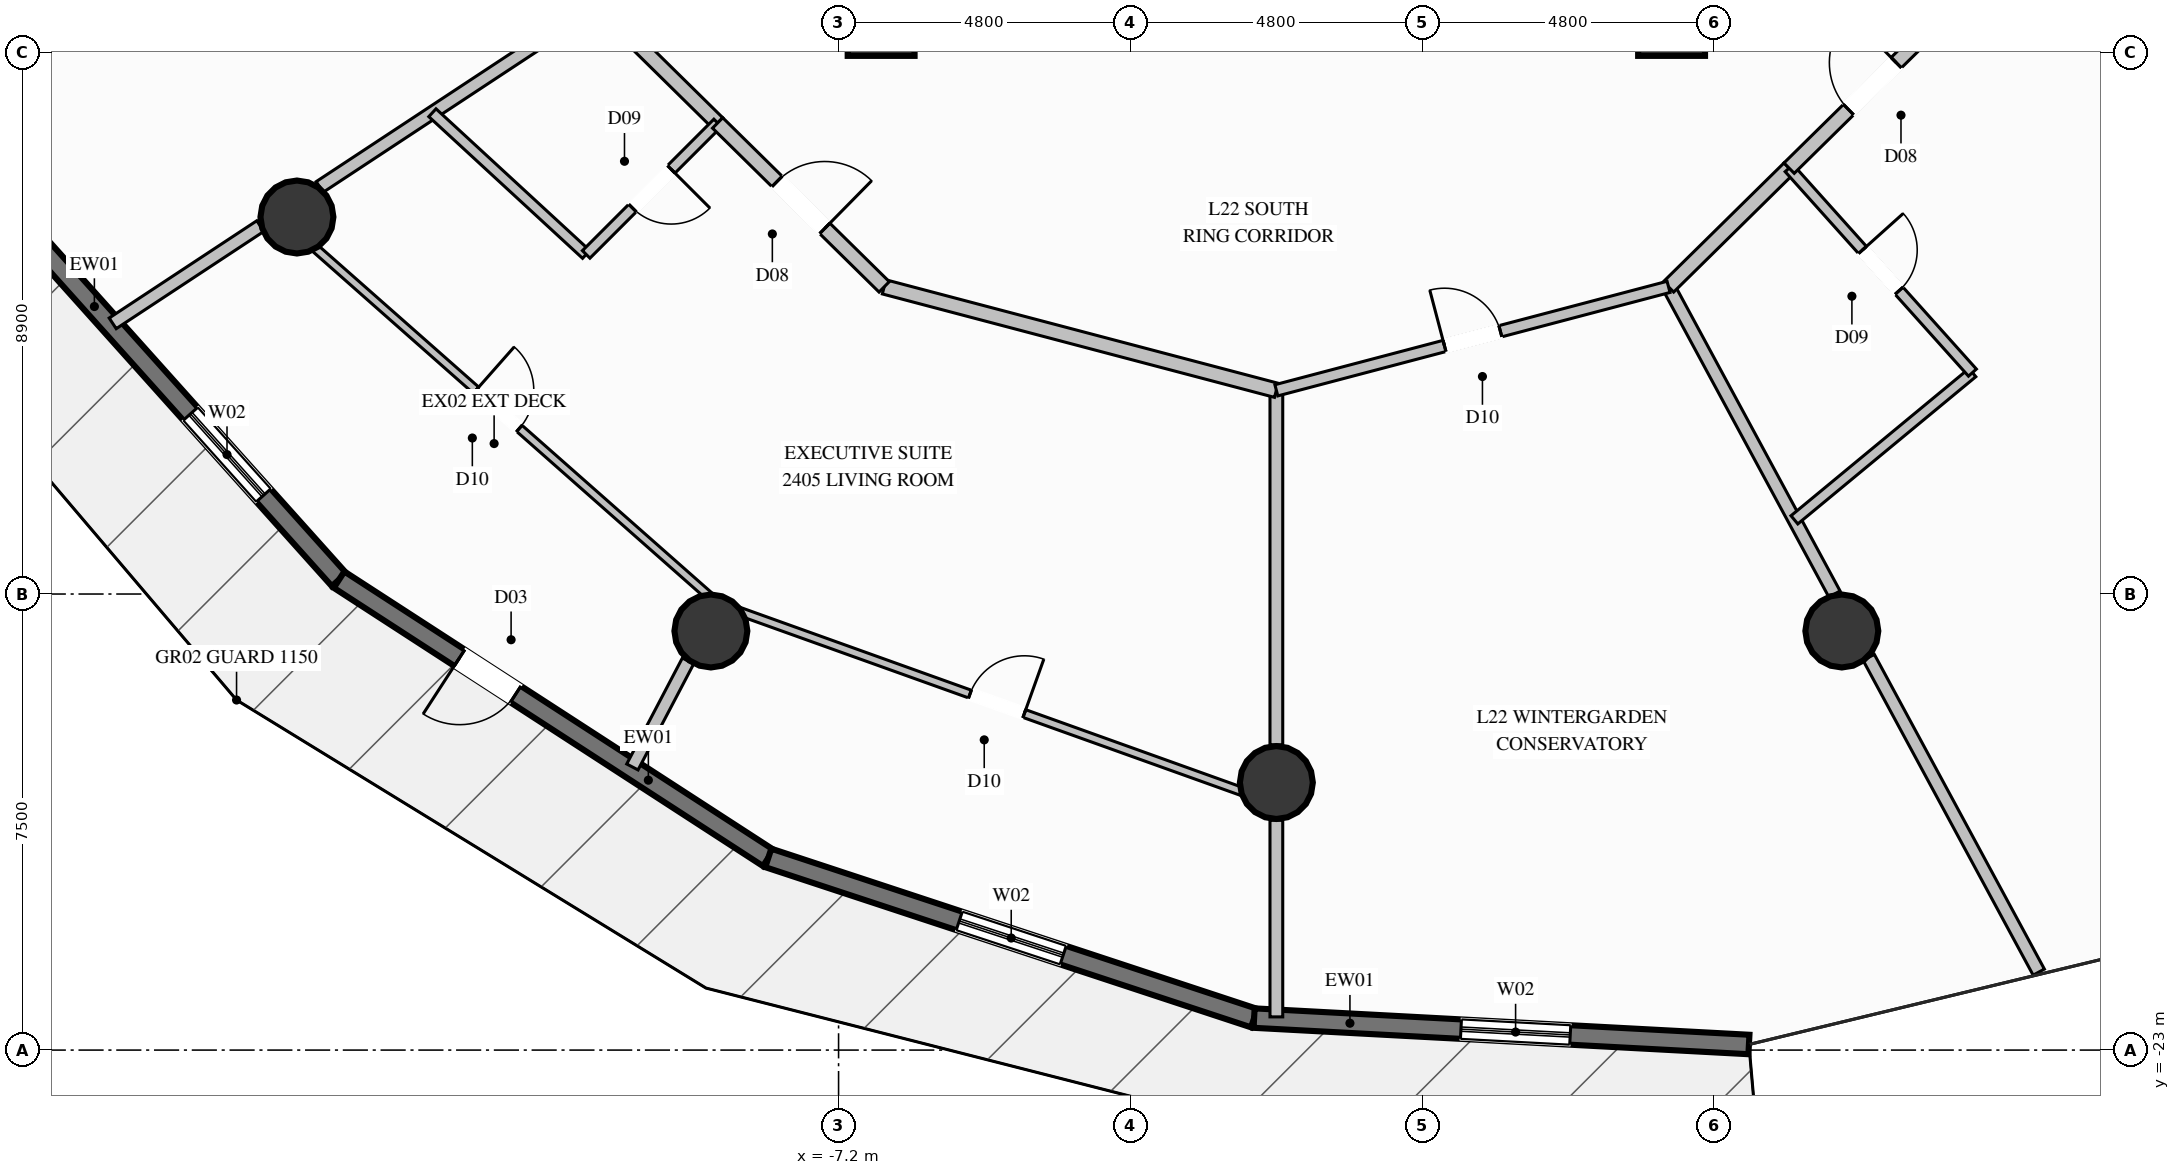
"""IFC4 building model, lengths in metres.
Left out: names, types, materials, properties, quantities, classifications, styles, units other than length and angle.
Written with IfcOpenShell. Run it as: python <this file> out.ifc"""

import sys

from ifc_helpers import new_model, si_unit, direction, frame, frame_2d, origin, origin_2d, place, context, subcontext, project, spatial, rectangle, circle, extrude, element, fill, save


model = new_model("IFC4")
c1 = context("Model", 3, precision=1e-05, world=origin(), true_north=direction((0.0, 1.0)))
c2 = subcontext(c1, "Body", "Model", "MODEL_VIEW")
j1 = project(units=[si_unit("LENGTHUNIT", "METRE"), si_unit("PLANEANGLEUNIT", "RADIAN")], contexts=[c1])
p1 = place(None, origin())
s1 = spatial("IfcSite", under=j1, at=p1, CompositionType="ELEMENT")
p2 = place(p1, origin())
s2 = spatial("IfcBuilding", under=s1, at=p2, CompositionType="ELEMENT")
p3 = place(p2, frame((0.0, 0.0, 89.6)))
s3 = spatial("IfcBuildingStorey", under=s2, at=p3, CompositionType="ELEMENT", Elevation=89.6)
for number, where, z_axis, x_axis in (
    (1, (-6.5, -6.1, 0.0), (0.0, 0.0, 1.0), (1.0, 0.0, 0.0)),
    (2, (6.5, -6.1, 0.0), (0.0, 0.0, 1.0), (1.0, 0.0, 0.0)),
):
    element("IfcColumn", number, at=place(p3, frame(where, z_axis=z_axis, x_axis=x_axis)), inside=s3, PredefinedType="COLUMN", context=c2, shape_type="SweptSolid", body=[
        extrude(rectangle(XDim=1.1, YDim=1.1, at=origin_2d()), origin(), (0.0, 0.0, 1.0), 3.6),
    ])
for number, where, z_axis, x_axis in (
    (3, (-16.108, -9.3, 0.0), (0.0, 0.0, 1.0), (1.0, 0.0, 0.0)),
    (4, (-9.3, -16.108, 0.0), (0.0, 0.0, 1.0), (1.0, 0.0, 0.0)),
    (5, (0.0, -18.6, 0.0), (0.0, 0.0, 1.0), (1.0, 0.0, 0.0)),
    (6, (9.3, -16.108, 0.0), (0.0, 0.0, 1.0), (1.0, 0.0, 0.0)),
):
    element("IfcColumn", number, at=place(p3, frame(where, z_axis=z_axis, x_axis=x_axis)), inside=s3, PredefinedType="COLUMN", context=c2, shape_type="SweptSolid", body=[
        extrude(circle(Radius=0.6, at=origin_2d()), origin(), (0.0, 0.0, 1.0), 3.6),
    ])
p4 = place(p3, frame((-15.415, -15.264, 0.0), z_axis=(0.0, 0.0, 1.0), x_axis=(-0.667278098427, 0.744808659563, 0.0)))
e7 = element("IfcWall", 7, at=p4, inside=s3, PredefinedType="SOLIDWALL", context=c2, shape_type="SweptSolid", body=[
    extrude(rectangle(XDim=8.149, YDim=0.32, at=frame_2d((4.075, 0.0))), origin(), (0.0, 0.0, 1.0), 3.2),
])
p5 = place(p4, frame((1.862, 0.0, 0.35)))
e8 = element("IfcOpeningElement", 8, at=p5, cuts=e7, PredefinedType="OPENING", context=c2, shape_type="SweptSolid", body=[
    extrude(rectangle(XDim=1.8, YDim=2.6, at=frame_2d((0.9, 1.3))), frame((0.0, 0.17, 0.0), z_axis=(0.0, -1.0, 0.0), x_axis=(1.0, 0.0, 0.0)), (0.0, 0.0, 1.0), 0.34),
])
p6 = place(p3, frame((-8.356, -19.84, 0.0), z_axis=(0.0, 0.0, 1.0), x_axis=(-0.839107360471, 0.543965842314, 0.0)))
e9 = element("IfcWall", 9, at=p6, inside=s3, PredefinedType="SOLIDWALL", context=c2, shape_type="SweptSolid", body=[
    extrude(rectangle(XDim=8.413, YDim=0.32, at=frame_2d((4.206, 0.0))), origin(), (0.0, 0.0, 1.0), 3.2),
])
p7 = place(p6, frame((4.951, 0.0, 0.0)))
e10 = element("IfcOpeningElement", 10, at=p7, cuts=e9, PredefinedType="OPENING", context=c2, shape_type="SweptSolid", body=[
    extrude(rectangle(XDim=1.1, YDim=2.2, at=frame_2d((0.55, 1.1))), frame((0.0, 0.17, 0.0), z_axis=(0.0, -1.0, 0.0), x_axis=(1.0, 0.0, 0.0)), (0.0, 0.0, 1.0), 0.34),
])
p8 = place(p3, frame((-0.366, -22.474, 0.0), z_axis=(0.0, 0.0, 1.0), x_axis=(-0.949722824856, 0.313091928908, 0.0)))
e11 = element("IfcWall", 11, at=p8, inside=s3, PredefinedType="SOLIDWALL", context=c2, shape_type="SweptSolid", body=[
    extrude(rectangle(XDim=8.413, YDim=0.32, at=frame_2d((4.207, 0.0))), origin(), (0.0, 0.0, 1.0), 3.2),
])
p9 = place(p8, frame((3.306, 0.0, 0.35)))
e12 = element("IfcOpeningElement", 12, at=p9, cuts=e11, PredefinedType="OPENING", context=c2, shape_type="SweptSolid", body=[
    extrude(rectangle(XDim=1.8, YDim=2.6, at=frame_2d((0.9, 1.3))), frame((0.0, 0.17, 0.0), z_axis=(0.0, -1.0, 0.0), x_axis=(1.0, 0.0, 0.0)), (0.0, 0.0, 1.0), 0.34),
])
p10 = place(p3, frame((7.772, -22.908, 0.0), z_axis=(0.0, 0.0, 1.0), x_axis=(-0.998582015263, 0.053234939583, 0.0)))
e13 = element("IfcWall", 13, at=p10, inside=s3, PredefinedType="SOLIDWALL", context=c2, shape_type="SweptSolid", body=[
    extrude(rectangle(XDim=8.149, YDim=0.32, at=frame_2d((4.075, 0.0))), origin(), (0.0, 0.0, 1.0), 3.2),
])
p11 = place(p10, frame((2.943, 0.0, 0.35)))
e14 = element("IfcOpeningElement", 14, at=p11, cuts=e13, PredefinedType="OPENING", context=c2, shape_type="SweptSolid", body=[
    extrude(rectangle(XDim=1.8, YDim=2.6, at=frame_2d((0.9, 1.3))), frame((0.0, 0.17, 0.0), z_axis=(0.0, -1.0, 0.0), x_axis=(1.0, 0.0, 0.0)), (0.0, 0.0, 1.0), 0.34),
])
p12 = place(p3, frame((-11.172, -5.8, 0.0), z_axis=(0.0, 0.0, 1.0), x_axis=(-0.835022135292, -0.550216351604, 0.0)))
e15 = element("IfcWall", 15, at=p12, inside=s3, PredefinedType="PARTITIONING", context=c2, shape_type="SweptSolid", body=[
    extrude(rectangle(XDim=5.463, YDim=0.21, at=frame_2d((2.731, 0.0))), origin(), (0.0, 0.0, 1.0), 2.067),
])
p13 = place(p3, frame((-16.71, -9.449, 0.0), z_axis=(0.0, 0.0, 1.0), x_axis=(-0.834983630618, -0.550274782813, 0.0)))
e16 = element("IfcWall", 16, at=p13, inside=s3, PredefinedType="PARTITIONING", context=c2, shape_type="SweptSolid", body=[
    extrude(rectangle(XDim=2.908, YDim=0.21, at=frame_2d((1.454, 0.0))), origin(), (0.0, 0.0, 1.0), 3.2),
])
p14 = place(p3, frame((0.0, -12.15, 0.0), z_axis=(0.0, 0.0, 1.0), x_axis=(0.0, -1.0, 0.0)))
e17 = element("IfcWall", 17, at=p14, inside=s3, PredefinedType="PARTITIONING", context=c2, shape_type="SweptSolid", body=[
    extrude(rectangle(XDim=5.83, YDim=0.21, at=frame_2d((2.915, 0.0))), origin(), (0.0, 0.0, 1.0), 2.067),
])
p15 = place(p3, frame((0.0, -19.22, 0.0), z_axis=(0.0, 0.0, 1.0), x_axis=(0.0, -1.0, 0.0)))
e18 = element("IfcWall", 18, at=p15, inside=s3, PredefinedType="PARTITIONING", context=c2, shape_type="SweptSolid", body=[
    extrude(rectangle(XDim=3.234, YDim=0.21, at=frame_2d((1.617, 0.0))), origin(), (0.0, 0.0, 1.0), 3.2),
])
p16 = place(p3, frame((6.45, -10.449, 0.0), z_axis=(0.0, 0.0, 1.0), x_axis=(0.475344473231, -0.879799767998, 0.0)))
e19 = element("IfcWall", 19, at=p16, inside=s3, PredefinedType="PARTITIONING", context=c2, shape_type="SweptSolid", body=[
    extrude(rectangle(XDim=5.741, YDim=0.21, at=frame_2d((2.871, 0.0))), origin(), (0.0, 0.0, 1.0), 2.067),
])
p17 = place(p3, frame((9.742, -16.542, 0.0), z_axis=(0.0, 0.0, 1.0), x_axis=(0.475420692092, -0.879758583664, 0.0)))
e20 = element("IfcWall", 20, at=p17, inside=s3, PredefinedType="PARTITIONING", context=c2, shape_type="SweptSolid", body=[
    extrude(rectangle(XDim=5.884, YDim=0.21, at=frame_2d((2.942, 0.0))), origin(), (0.0, 0.0, 1.0), 3.2),
])
p18 = place(p3, frame((6.45, -10.449, 0.0), z_axis=(0.0, 0.0, 1.0), x_axis=(0.712524314294, 0.701647419677, 0.0)))
e21 = element("IfcWall", 21, at=p18, inside=s3, PredefinedType="PARTITIONING", context=c2, shape_type="SweptSolid", body=[
    extrude(rectangle(XDim=2.783, YDim=0.24, at=frame_2d((1.392, 0.0))), origin(), (0.0, 0.0, 1.0), 3.2),
])
p19 = place(p3, frame((8.52, -14.28, 0.0), z_axis=(0.0, 0.0, 1.0), x_axis=(0.770654375428, 0.637253351215, 0.0)))
e22 = element("IfcWall", 22, at=p19, inside=s3, PredefinedType="PLUMBINGWALL", context=c2, shape_type="SweptSolid", body=[
    extrude(rectangle(XDim=3.799, YDim=0.175, at=frame_2d((1.9, 0.0))), origin(), (0.0, 0.0, 1.0), 3.2),
])
p20 = place(p3, frame((8.433, -8.496, 0.0), z_axis=(0.0, 0.0, 1.0), x_axis=(0.667541915613, -0.74457222007, 0.0)))
e23 = element("IfcWall", 23, at=p20, inside=s3, PredefinedType="PLUMBINGWALL", context=c2, shape_type="SweptSolid", body=[
    extrude(rectangle(XDim=4.516, YDim=0.175, at=frame_2d((2.258, 0.0))), origin(), (0.0, 0.0, 1.0), 3.2),
])
p21 = place(p20, frame((1.808, 0.0, 0.0)))
e24 = element("IfcOpeningElement", 24, at=p21, cuts=e23, PredefinedType="OPENING", context=c2, shape_type="SweptSolid", body=[
    extrude(rectangle(XDim=0.9, YDim=2.1, at=frame_2d((0.45, 1.05))), frame((0.0, 0.098, 0.0), z_axis=(0.0, -1.0, 0.0), x_axis=(1.0, 0.0, 0.0)), (0.0, 0.0, 1.0), 0.195),
])
p22 = place(p3, frame((8.433, -8.496, 0.0), z_axis=(0.0, 0.0, 1.0), x_axis=(0.712674788685, 0.70149457986, 0.0)))
e25 = element("IfcWall", 25, at=p22, inside=s3, PredefinedType="PARTITIONING", context=c2, shape_type="SweptSolid", body=[
    extrude(rectangle(XDim=3.843, YDim=0.24, at=frame_2d((1.922, 0.0))), origin(), (0.0, 0.0, 1.0), 3.2),
])
p23 = place(p22, frame((1.372, 0.0, 0.0)))
e26 = element("IfcOpeningElement", 26, at=p23, cuts=e25, PredefinedType="OPENING", context=c2, shape_type="SweptSolid", body=[
    extrude(rectangle(XDim=1.1, YDim=2.3, at=frame_2d((0.55, 1.15))), frame((0.0, 0.13, 0.0), z_axis=(0.0, -1.0, 0.0), x_axis=(1.0, 0.0, 0.0)), (0.0, 0.0, 1.0), 0.26),
])
p24 = place(p3, frame((-11.172, -5.8, 0.0), z_axis=(0.0, 0.0, 1.0), x_axis=(0.712524314294, -0.701647419677, 0.0)))
e27 = element("IfcWall", 27, at=p24, inside=s3, PredefinedType="PARTITIONING", context=c2, shape_type="SweptSolid", body=[
    extrude(rectangle(XDim=2.783, YDim=0.24, at=frame_2d((1.392, 0.0))), origin(), (0.0, 0.0, 1.0), 3.2),
])
p25 = place(p3, frame((-13.88, -7.585, 0.0), z_axis=(0.0, 0.0, 1.0), x_axis=(0.735412881507, -0.677619283752, 0.0)))
e28 = element("IfcWall", 28, at=p25, inside=s3, PredefinedType="PLUMBINGWALL", context=c2, shape_type="SweptSolid", body=[
    extrude(rectangle(XDim=3.439, YDim=0.175, at=frame_2d((1.719, 0.0))), origin(), (0.0, 0.0, 1.0), 3.2),
])
p26 = place(p3, frame((-9.189, -7.753, 0.0), z_axis=(0.0, 0.0, 1.0), x_axis=(-0.707106781187, -0.707106781187, 0.0)))
e29 = element("IfcWall", 29, at=p26, inside=s3, PredefinedType="PLUMBINGWALL", context=c2, shape_type="SweptSolid", body=[
    extrude(rectangle(XDim=3.058, YDim=0.175, at=frame_2d((1.529, 0.0))), origin(), (0.0, 0.0, 1.0), 3.2),
])
p27 = place(p26, frame((1.079, 0.0, 0.0)))
e30 = element("IfcOpeningElement", 30, at=p27, cuts=e29, PredefinedType="OPENING", context=c2, shape_type="SweptSolid", body=[
    extrude(rectangle(XDim=0.9, YDim=2.1, at=frame_2d((0.45, 1.05))), frame((0.0, 0.098, 0.0), z_axis=(0.0, -1.0, 0.0), x_axis=(1.0, 0.0, 0.0)), (0.0, 0.0, 1.0), 0.195),
])
p28 = place(p3, frame((-9.676, -16.601, 0.0), z_axis=(0.0, 0.0, 1.0), x_axis=(-0.46483632961, -0.885396626758, 0.0)))
e31 = element("IfcWall", 31, at=p28, inside=s3, PredefinedType="PARTITIONING", context=c2, shape_type="SweptSolid", body=[
    extrude(rectangle(XDim=1.969, YDim=0.21, at=frame_2d((0.984, 0.0))), origin(), (0.0, 0.0, 1.0), 3.2),
])
p29 = place(p3, frame((-6.45, -10.449, 0.0), z_axis=(0.0, 0.0, 1.0), x_axis=(0.966942608664, -0.254994101009, 0.0)))
e32 = element("IfcWall", 32, at=p29, inside=s3, PredefinedType="PARTITIONING", context=c2, shape_type="SweptSolid", body=[
    extrude(rectangle(XDim=6.67, YDim=0.24, at=frame_2d((3.335, 0.0))), origin(), (0.0, 0.0, 1.0), 3.2),
])
p30 = place(p3, frame((-9.189, -7.753, 0.0), z_axis=(0.0, 0.0, 1.0), x_axis=(0.712674788685, -0.70149457986, 0.0)))
e33 = element("IfcWall", 33, at=p30, inside=s3, PredefinedType="PARTITIONING", context=c2, shape_type="SweptSolid", body=[
    extrude(rectangle(XDim=3.843, YDim=0.24, at=frame_2d((1.922, 0.0))), origin(), (0.0, 0.0, 1.0), 3.2),
])
p31 = place(p30, frame((1.372, 0.0, 0.0)))
e34 = element("IfcOpeningElement", 34, at=p31, cuts=e33, PredefinedType="OPENING", context=c2, shape_type="SweptSolid", body=[
    extrude(rectangle(XDim=1.1, YDim=2.3, at=frame_2d((0.55, 1.15))), frame((0.0, 0.13, 0.0), z_axis=(0.0, -1.0, 0.0), x_axis=(1.0, 0.0, 0.0)), (0.0, 0.0, 1.0), 0.26),
])
p32 = place(p3, frame((-16.43, -9.264, 0.0), z_axis=(0.0, 0.0, 1.0), x_axis=(0.749748657473, -0.661722714297, 0.0)))
e35 = element("IfcWall", 35, at=p32, inside=s3, PredefinedType="PARTITIONING", context=c2, shape_type="SweptSolid", body=[
    extrude(rectangle(XDim=9.666, YDim=0.135, at=frame_2d((4.833, 0.0))), origin(), (0.0, 0.0, 1.0), 2.653),
])
p33 = place(p32, frame((4.358, 0.0, 0.0)))
e36 = element("IfcOpeningElement", 36, at=p33, cuts=e35, PredefinedType="OPENING", context=c2, shape_type="SweptSolid", body=[
    extrude(rectangle(XDim=0.95, YDim=2.1, at=frame_2d((0.475, 1.05))), frame((0.0, 0.078, 0.0), z_axis=(0.0, -1.0, 0.0), x_axis=(1.0, 0.0, 0.0)), (0.0, 0.0, 1.0), 0.155),
])
p34 = place(p3, frame((-9.183, -15.66, 0.0), z_axis=(0.0, 0.0, 1.0), x_axis=(0.941373300611, -0.337366727608, 0.0)))
e37 = element("IfcWall", 37, at=p34, inside=s3, PredefinedType="PARTITIONING", context=c2, shape_type="SweptSolid", body=[
    extrude(rectangle(XDim=9.755, YDim=0.135, at=frame_2d((4.877, 0.0))), origin(), (0.0, 0.0, 1.0), 2.653),
])
p35 = place(p34, frame((4.402, 0.0, 0.0)))
e38 = element("IfcOpeningElement", 38, at=p35, cuts=e37, PredefinedType="OPENING", context=c2, shape_type="SweptSolid", body=[
    extrude(rectangle(XDim=0.95, YDim=2.1, at=frame_2d((0.475, 1.05))), frame((0.0, 0.078, 0.0), z_axis=(0.0, -1.0, 0.0), x_axis=(1.0, 0.0, 0.0)), (0.0, 0.0, 1.0), 0.155),
])
p36 = place(p3, frame((0.0, -12.15, 0.0), z_axis=(0.0, 0.0, 1.0), x_axis=(0.966942608664, 0.254994101009, 0.0)))
e39 = element("IfcWall", 39, at=p36, inside=s3, PredefinedType="PARTITIONING", context=c2, shape_type="SweptSolid", body=[
    extrude(rectangle(XDim=6.67, YDim=0.19, at=frame_2d((3.335, 0.0))), origin(), (0.0, 0.0, 1.0), 3.2),
])
p37 = place(p36, frame((2.86, 0.0, 0.0)))
e40 = element("IfcOpeningElement", 40, at=p37, cuts=e39, PredefinedType="OPENING", context=c2, shape_type="SweptSolid", body=[
    extrude(rectangle(XDim=0.95, YDim=2.1, at=frame_2d((0.475, 1.05))), frame((0.0, 0.105, 0.0), z_axis=(0.0, -1.0, 0.0), x_axis=(1.0, 0.0, 0.0)), (0.0, 0.0, 1.0), 0.21),
])
p38 = place(p5, origin())
e41 = element("IfcWindow", 41, at=p38, inside=s3, PartitioningType="SINGLE_PANEL", PredefinedType="WINDOW", context=c2, shape_type="SweptSolid", body=[
    extrude(rectangle(XDim=1.8, YDim=2.6, at=frame_2d((0.9, 1.3))), frame((0.0, 0.03, 0.0), z_axis=(0.0, -1.0, 0.0), x_axis=(1.0, 0.0, 0.0)), (0.0, 0.0, 1.0), 0.06),
])
fill(e8, e41)
p39 = place(p7, origin())
e42 = element("IfcDoor", 42, at=p39, inside=s3, OperationType="SINGLE_SWING_RIGHT", PredefinedType="DOOR", context=c2, shape_type="SweptSolid", body=[
    extrude(rectangle(XDim=1.1, YDim=2.2, at=frame_2d((0.55, 1.1))), frame((0.0, 0.025, 0.0), z_axis=(0.0, -1.0, 0.0), x_axis=(1.0, 0.0, 0.0)), (0.0, 0.0, 1.0), 0.05),
])
fill(e10, e42)
p40 = place(p9, origin())
e43 = element("IfcWindow", 43, at=p40, inside=s3, PartitioningType="SINGLE_PANEL", PredefinedType="WINDOW", context=c2, shape_type="SweptSolid", body=[
    extrude(rectangle(XDim=1.8, YDim=2.6, at=frame_2d((0.9, 1.3))), frame((0.0, 0.03, 0.0), z_axis=(0.0, -1.0, 0.0), x_axis=(1.0, 0.0, 0.0)), (0.0, 0.0, 1.0), 0.06),
])
fill(e12, e43)
p41 = place(p11, origin())
e44 = element("IfcWindow", 44, at=p41, inside=s3, PartitioningType="SINGLE_PANEL", PredefinedType="WINDOW", context=c2, shape_type="SweptSolid", body=[
    extrude(rectangle(XDim=1.8, YDim=2.6, at=frame_2d((0.9, 1.3))), frame((0.0, 0.03, 0.0), z_axis=(0.0, -1.0, 0.0), x_axis=(1.0, 0.0, 0.0)), (0.0, 0.0, 1.0), 0.06),
])
fill(e14, e44)
p42 = place(p21, origin())
e45 = element("IfcDoor", 45, at=p42, inside=s3, OperationType="SINGLE_SWING_LEFT", PredefinedType="DOOR", context=c2, shape_type="SweptSolid", body=[
    extrude(rectangle(XDim=0.9, YDim=2.1, at=frame_2d((0.45, 1.05))), frame((0.0, 0.025, 0.0), z_axis=(0.0, -1.0, 0.0), x_axis=(1.0, 0.0, 0.0)), (0.0, 0.0, 1.0), 0.05),
])
fill(e24, e45)
p43 = place(p23, origin())
e46 = element("IfcDoor", 46, at=p43, inside=s3, OperationType="SINGLE_SWING_RIGHT", PredefinedType="DOOR", context=c2, shape_type="SweptSolid", body=[
    extrude(rectangle(XDim=1.1, YDim=2.3, at=frame_2d((0.55, 1.15))), frame((0.0, 0.025, 0.0), z_axis=(0.0, -1.0, 0.0), x_axis=(1.0, 0.0, 0.0)), (0.0, 0.0, 1.0), 0.05),
])
fill(e26, e46)
p44 = place(p27, origin())
e47 = element("IfcDoor", 47, at=p44, inside=s3, OperationType="SINGLE_SWING_LEFT", PredefinedType="DOOR", context=c2, shape_type="SweptSolid", body=[
    extrude(rectangle(XDim=0.9, YDim=2.1, at=frame_2d((0.45, 1.05))), frame((0.0, 0.025, 0.0), z_axis=(0.0, -1.0, 0.0), x_axis=(1.0, 0.0, 0.0)), (0.0, 0.0, 1.0), 0.05),
])
fill(e30, e47)
p45 = place(p31, origin())
e48 = element("IfcDoor", 48, at=p45, inside=s3, OperationType="SINGLE_SWING_RIGHT", PredefinedType="DOOR", context=c2, shape_type="SweptSolid", body=[
    extrude(rectangle(XDim=1.1, YDim=2.3, at=frame_2d((0.55, 1.15))), frame((0.0, 0.025, 0.0), z_axis=(0.0, -1.0, 0.0), x_axis=(1.0, 0.0, 0.0)), (0.0, 0.0, 1.0), 0.05),
])
fill(e34, e48)
p46 = place(p33, origin())
e49 = element("IfcDoor", 49, at=p46, inside=s3, OperationType="SINGLE_SWING_LEFT", PredefinedType="DOOR", context=c2, shape_type="SweptSolid", body=[
    extrude(rectangle(XDim=0.95, YDim=2.1, at=frame_2d((0.475, 1.05))), frame((0.0, 0.025, 0.0), z_axis=(0.0, -1.0, 0.0), x_axis=(1.0, 0.0, 0.0)), (0.0, 0.0, 1.0), 0.05),
])
fill(e36, e49)
p47 = place(p35, origin())
e50 = element("IfcDoor", 50, at=p47, inside=s3, OperationType="SINGLE_SWING_RIGHT", PredefinedType="DOOR", context=c2, shape_type="SweptSolid", body=[
    extrude(rectangle(XDim=0.95, YDim=2.1, at=frame_2d((0.475, 1.05))), frame((0.0, 0.025, 0.0), z_axis=(0.0, -1.0, 0.0), x_axis=(1.0, 0.0, 0.0)), (0.0, 0.0, 1.0), 0.05),
])
fill(e38, e50)
p48 = place(p37, origin())
e51 = element("IfcDoor", 51, at=p48, inside=s3, OperationType="SINGLE_SWING_LEFT", PredefinedType="DOOR", context=c2, shape_type="SweptSolid", body=[
    extrude(rectangle(XDim=0.95, YDim=2.1, at=frame_2d((0.475, 1.05))), frame((0.0, 0.025, 0.0), z_axis=(0.0, -1.0, 0.0), x_axis=(1.0, 0.0, 0.0)), (0.0, 0.0, 1.0), 0.05),
])
fill(e40, e51)
save(model, sys.argv[1])
